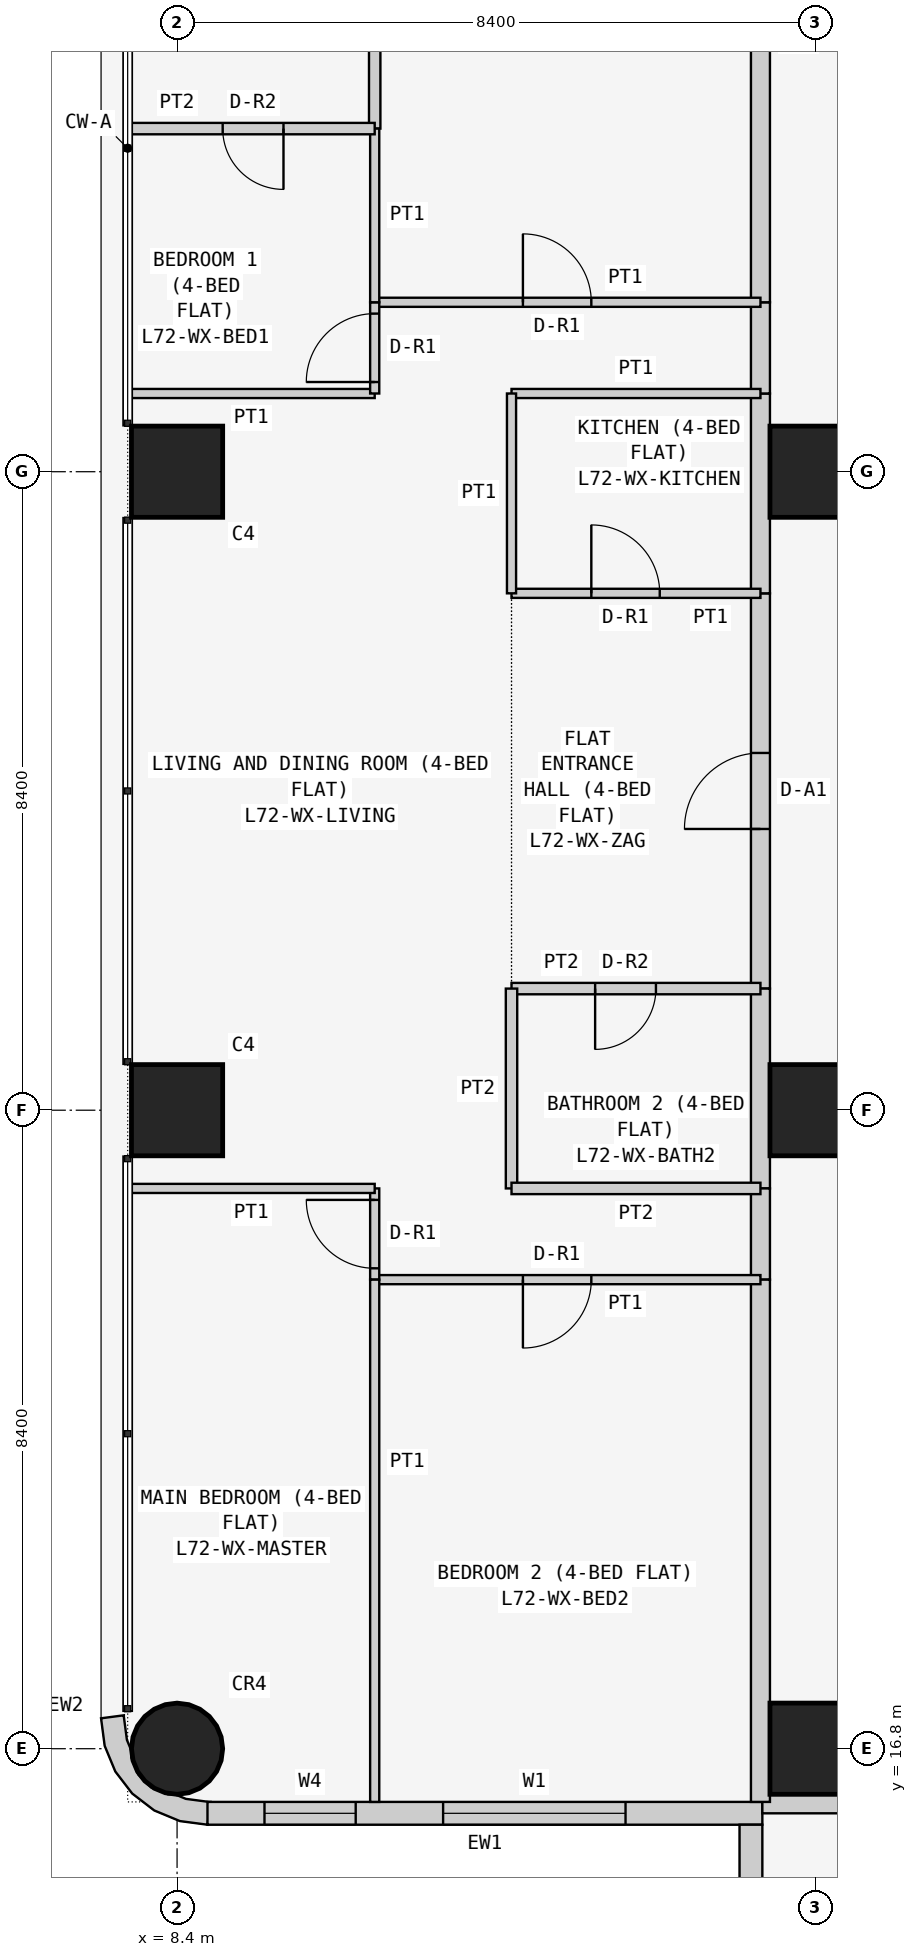
"""IFC4 building model, lengths in metres.
Left out: names, types, materials, properties, quantities, classifications, styles, units other than length and angle.
Written with IfcOpenShell. Run it as: python <this file> out.ifc"""

import sys

from ifc_helpers import new_model, si_unit, direction, frame, frame_2d, origin, origin_2d, place, context, subcontext, project, spatial, polyline, rectangle, circle, outline, extrude, element, fill, save


model = new_model("IFC4")
c1 = context("Model", 3, precision=1e-05, world=origin(), true_north=direction((0.0, 1.0)))
c2 = subcontext(c1, "Body", "Model", "MODEL_VIEW")
j1 = project(units=[si_unit("LENGTHUNIT", "METRE"), si_unit("PLANEANGLEUNIT", "RADIAN")], contexts=[c1])
p1 = place(None, origin())
s1 = spatial("IfcSite", under=j1, at=p1, CompositionType="ELEMENT")
p2 = place(p1, origin())
s2 = spatial("IfcBuilding", under=s1, at=p2, CompositionType="ELEMENT")
p3 = place(p2, frame((0.0, 0.0, 275.7)))
s3 = spatial("IfcBuildingStorey", under=s2, at=p3, CompositionType="ELEMENT", Elevation=275.7)
p4 = place(p3, frame((8.4, 16.8, 0.0), z_axis=(0.0, 0.0, 1.0), x_axis=(1.0, 0.0, 0.0)))
e1 = element("IfcColumn", 1, at=p4, inside=s3, PredefinedType="COLUMN", context=c2, shape_type="SweptSolid", body=[
    extrude(circle(Radius=0.6, at=origin_2d()), origin(), (0.0, 0.0, 1.0), 3.6),
])
for number, where, z_axis, x_axis in (
    (2, (8.4, 25.2, 0.0), (0.0, 0.0, 1.0), (1.0, 0.0, 0.0)),
    (3, (8.4, 33.6, 0.0), (0.0, 0.0, 1.0), (1.0, 0.0, 0.0)),
    (4, (16.8, 16.8, 0.0), (0.0, 0.0, 1.0), (1.0, 0.0, 0.0)),
    (5, (16.8, 25.2, 0.0), (0.0, 0.0, 1.0), (1.0, 0.0, 0.0)),
    (6, (16.8, 33.6, 0.0), (0.0, 0.0, 1.0), (1.0, 0.0, 0.0)),
):
    element("IfcColumn", number, at=place(p3, frame(where, z_axis=z_axis, x_axis=x_axis)), inside=s3, PredefinedType="COLUMN", context=c2, shape_type="SweptSolid", body=[
        extrude(rectangle(XDim=1.2, YDim=1.2, at=origin_2d()), origin(), (0.0, 0.0, 1.0), 3.6),
    ])
p5 = place(p3, frame((8.8, 15.95, 0.0), z_axis=(0.0, 0.0, 1.0), x_axis=(1.0, 0.0, 0.0)))
e7 = element("IfcWall", 7, at=p5, inside=s3, PredefinedType="SOLIDWALL", context=c2, shape_type="SweptSolid", body=[
    extrude(rectangle(XDim=7.3, YDim=0.3, at=frame_2d((3.65, 0.0))), origin(), (0.0, 0.0, 1.0), 3.45),
])
p6 = place(p5, frame((3.1, 0.0, 0.9)))
e8 = element("IfcOpeningElement", 8, at=p6, cuts=e7, PredefinedType="OPENING", context=c2, shape_type="SweptSolid", body=[
    extrude(rectangle(XDim=2.4, YDim=1.5, at=frame_2d((1.2, 0.75))), frame((0.0, 0.16, 0.0), z_axis=(0.0, -1.0, 0.0), x_axis=(1.0, 0.0, 0.0)), (0.0, 0.0, 1.0), 0.32),
])
p7 = place(p5, frame((0.75, 0.0, 0.9)))
e9 = element("IfcOpeningElement", 9, at=p7, cuts=e7, PredefinedType="OPENING", context=c2, shape_type="SweptSolid", body=[
    extrude(rectangle(XDim=1.2, YDim=1.5, at=frame_2d((0.6, 0.75))), frame((0.0, 0.16, 0.0), z_axis=(0.0, -1.0, 0.0), x_axis=(1.0, 0.0, 0.0)), (0.0, 0.0, 1.0), 0.32),
])
p8 = place(p3, frame((15.95, 15.8, 0.0), z_axis=(0.0, 0.0, 1.0), x_axis=(0.0, -1.0, 0.0)))
e10 = element("IfcWall", 10, at=p8, inside=s3, PredefinedType="SOLIDWALL", context=c2, shape_type="SweptSolid", body=[
    extrude(rectangle(XDim=7.0, YDim=0.3, at=frame_2d((3.5, 0.0))), origin(), (0.0, 0.0, 1.0), 3.45),
])
p9 = place(p8, frame((1.5, 0.0, 0.9)))
e11 = element("IfcOpeningElement", 11, at=p9, cuts=e10, PredefinedType="OPENING", context=c2, shape_type="SweptSolid", body=[
    extrude(rectangle(XDim=2.4, YDim=1.5, at=frame_2d((1.2, 0.75))), frame((0.0, 0.16, 0.0), z_axis=(0.0, -1.0, 0.0), x_axis=(1.0, 0.0, 0.0)), (0.0, 0.0, 1.0), 0.32),
])
p10 = place(p8, frame((5.05, 0.0, 0.9)))
e12 = element("IfcOpeningElement", 12, at=p10, cuts=e10, PredefinedType="OPENING", context=c2, shape_type="SweptSolid", body=[
    extrude(rectangle(XDim=1.2, YDim=1.5, at=frame_2d((0.6, 0.75))), frame((0.0, 0.16, 0.0), z_axis=(0.0, -1.0, 0.0), x_axis=(1.0, 0.0, 0.0)), (0.0, 0.0, 1.0), 0.32),
])
p11 = place(p3, frame((7.824, 17.162, 0.0), z_axis=(0.0, 0.0, 1.0), x_axis=(-0.707106781187, -0.707106781187, 0.0)))
e13 = element("IfcWall", 13, at=p11, inside=s3, PredefinedType="SOLIDWALL", context=c2, shape_type="SweptSolid", body=[
    extrude(outline(polyline([(0.047, 1.454), (0.233, 1.212), (0.292, 1.069), (0.358, 1.003), (0.449, 0.782), (0.449, 0.543), (0.358, 0.323), (0.292, 0.257), (0.233, 0.114), (0.047, -0.129), (0.033, -0.143), (0.273, -0.327), (0.495, -0.037), (0.635, 0.301), (0.683, 0.663), (0.635, 1.025), (0.495, 1.363), (0.273, 1.653), (0.033, 1.469), (0.047, 1.454)])), origin(), (0.0, 0.0, 1.0), 3.45),
])
p12 = place(p3, frame((22.571, 16.075, 0.0), z_axis=(0.0, 0.0, 1.0), x_axis=(-1.0, 0.0, 0.0)))
e14 = element("IfcWall", 14, at=p12, inside=s3, PredefinedType="PARTITIONING", context=c2, shape_type="SweptSolid", body=[
    extrude(rectangle(XDim=6.471, YDim=0.25, at=frame_2d((3.235, 0.0))), origin(), (0.0, 0.0, 1.0), 3.45),
])
p13 = place(p3, frame((16.075, 26.8, 0.0), z_axis=(0.0, 0.0, 1.0), x_axis=(0.0, 1.0, 0.0)))
e15 = element("IfcWall", 15, at=p13, inside=s3, PredefinedType="PARTITIONING", context=c2, shape_type="SweptSolid", body=[
    extrude(rectangle(XDim=5.2, YDim=0.25, at=frame_2d((2.6, 0.0))), origin(), (0.0, 0.0, 1.0), 3.45),
])
p14 = place(p13, frame((2.1, 0.0, 0.0)))
e16 = element("IfcOpeningElement", 16, at=p14, cuts=e15, PredefinedType="OPENING", context=c2, shape_type="SweptSolid", body=[
    extrude(rectangle(XDim=1.0, YDim=2.1, at=frame_2d((0.5, 1.05))), frame((0.0, 0.135, 0.0), z_axis=(0.0, -1.0, 0.0), x_axis=(1.0, 0.0, 0.0)), (0.0, 0.0, 1.0), 0.27),
])
p15 = place(p3, frame((16.075, 24.171, 0.0), z_axis=(0.0, 0.0, 1.0), x_axis=(0.0, 1.0, 0.0)))
e17 = element("IfcWall", 17, at=p15, inside=s3, PredefinedType="PARTITIONING", context=c2, shape_type="SweptSolid", body=[
    extrude(rectangle(XDim=2.629, YDim=0.25, at=frame_2d((1.314, 0.0))), origin(), (0.0, 0.0, 1.0), 3.45),
])
p16 = place(p3, frame((16.075, 32.0, 0.0), z_axis=(0.0, 0.0, 1.0), x_axis=(0.0, 1.0, 0.0)))
e18 = element("IfcWall", 18, at=p16, inside=s3, PredefinedType="PARTITIONING", context=c2, shape_type="SweptSolid", body=[
    extrude(rectangle(XDim=2.629, YDim=0.25, at=frame_2d((1.314, 0.0))), origin(), (0.0, 0.0, 1.0), 3.45),
])
p17 = place(p3, frame((16.075, 22.971, 0.0), z_axis=(0.0, 0.0, 1.0), x_axis=(0.0, 1.0, 0.0)))
e19 = element("IfcWall", 19, at=p17, inside=s3, PredefinedType="PARTITIONING", context=c2, shape_type="SweptSolid", body=[
    extrude(rectangle(XDim=1.2, YDim=0.25, at=frame_2d((0.6, 0.0))), origin(), (0.0, 0.0, 1.0), 3.45),
])
p18 = place(p3, frame((16.075, 34.629, 0.0), z_axis=(0.0, 0.0, 1.0), x_axis=(0.0, 1.0, 0.0)))
e20 = element("IfcWall", 20, at=p18, inside=s3, PredefinedType="PARTITIONING", context=c2, shape_type="SweptSolid", body=[
    extrude(rectangle(XDim=1.2, YDim=0.25, at=frame_2d((0.6, 0.0))), origin(), (0.0, 0.0, 1.0), 3.45),
])
for number, where, z_axis, x_axis in (
    (21, (16.075, 16.1, 0.0), (0.0, 0.0, 1.0), (0.0, 1.0, 0.0)),
    (22, (16.075, 35.829, 0.0), (0.0, 0.0, 1.0), (0.0, 1.0, 0.0)),
):
    element("IfcWall", number, at=place(p3, frame(where, z_axis=z_axis, x_axis=x_axis)), inside=s3, PredefinedType="PARTITIONING", context=c2, shape_type="SweptSolid", body=[
        extrude(rectangle(XDim=6.871, YDim=0.25, at=frame_2d((3.436, 0.0))), origin(), (0.0, 0.0, 1.0), 3.45),
    ])
p19 = place(p3, frame((12.8, 26.8, 0.0), z_axis=(0.0, 0.0, 1.0), x_axis=(1.0, 0.0, 0.0)))
e23 = element("IfcWall", 23, at=p19, inside=s3, PredefinedType="PARTITIONING", context=c2, shape_type="SweptSolid", body=[
    extrude(rectangle(XDim=3.275, YDim=0.15, at=frame_2d((1.637, 0.0))), origin(), (0.0, 0.0, 1.0), 3.45),
])
p20 = place(p19, frame((1.1, 0.0, 0.0)))
e24 = element("IfcOpeningElement", 24, at=p20, cuts=e23, PredefinedType="OPENING", context=c2, shape_type="SweptSolid", body=[
    extrude(rectangle(XDim=0.8, YDim=2.1, at=frame_2d((0.4, 1.05))), frame((0.0, 0.085, 0.0), z_axis=(0.0, -1.0, 0.0), x_axis=(1.0, 0.0, 0.0)), (0.0, 0.0, 1.0), 0.17),
])
p21 = place(p3, frame((16.075, 32.0, 0.0), z_axis=(0.0, 0.0, 1.0), x_axis=(-1.0, 0.0, 0.0)))
e25 = element("IfcWall", 25, at=p21, inside=s3, PredefinedType="PARTITIONING", context=c2, shape_type="SweptSolid", body=[
    extrude(rectangle(XDim=3.275, YDim=0.12, at=frame_2d((1.637, 0.0))), origin(), (0.0, 0.0, 1.0), 3.45),
])
p22 = place(p21, frame((1.325, 0.0, 0.0)))
e26 = element("IfcOpeningElement", 26, at=p22, cuts=e25, PredefinedType="OPENING", context=c2, shape_type="SweptSolid", body=[
    extrude(rectangle(XDim=0.9, YDim=2.1, at=frame_2d((0.45, 1.05))), frame((0.0, 0.07, 0.0), z_axis=(0.0, -1.0, 0.0), x_axis=(1.0, 0.0, 0.0)), (0.0, 0.0, 1.0), 0.14),
])
p23 = place(p3, frame((12.8, 26.8, 0.0), z_axis=(0.0, 0.0, 1.0), x_axis=(0.0, -1.0, 0.0)))
e27 = element("IfcWall", 27, at=p23, inside=s3, PredefinedType="PARTITIONING", context=c2, shape_type="SweptSolid", body=[
    extrude(rectangle(XDim=2.629, YDim=0.15, at=frame_2d((1.314, 0.0))), origin(), (0.0, 0.0, 1.0), 3.45),
])
p24 = place(p3, frame((12.8, 24.171, 0.0), z_axis=(0.0, 0.0, 1.0), x_axis=(1.0, 0.0, 0.0)))
e28 = element("IfcWall", 28, at=p24, inside=s3, PredefinedType="PARTITIONING", context=c2, shape_type="SweptSolid", body=[
    extrude(rectangle(XDim=3.275, YDim=0.15, at=frame_2d((1.637, 0.0))), origin(), (0.0, 0.0, 1.0), 3.45),
])
p25 = place(p3, frame((16.075, 34.629, 0.0), z_axis=(0.0, 0.0, 1.0), x_axis=(-1.0, 0.0, 0.0)))
e29 = element("IfcWall", 29, at=p25, inside=s3, PredefinedType="PARTITIONING", context=c2, shape_type="SweptSolid", body=[
    extrude(rectangle(XDim=3.275, YDim=0.12, at=frame_2d((1.637, 0.0))), origin(), (0.0, 0.0, 1.0), 3.45),
])
p26 = place(p3, frame((12.8, 34.629, 0.0), z_axis=(0.0, 0.0, 1.0), x_axis=(0.0, -1.0, 0.0)))
e30 = element("IfcWall", 30, at=p26, inside=s3, PredefinedType="PARTITIONING", context=c2, shape_type="SweptSolid", body=[
    extrude(rectangle(XDim=2.629, YDim=0.12, at=frame_2d((1.314, 0.0))), origin(), (0.0, 0.0, 1.0), 3.45),
])
p27 = place(p3, frame((16.075, 22.971, 0.0), z_axis=(0.0, 0.0, 1.0), x_axis=(-1.0, 0.0, 0.0)))
e31 = element("IfcWall", 31, at=p27, inside=s3, PredefinedType="PARTITIONING", context=c2, shape_type="SweptSolid", body=[
    extrude(rectangle(XDim=5.075, YDim=0.12, at=frame_2d((2.538, 0.0))), origin(), (0.0, 0.0, 1.0), 3.45),
])
p28 = place(p27, frame((2.225, 0.0, 0.0)))
e32 = element("IfcOpeningElement", 32, at=p28, cuts=e31, PredefinedType="OPENING", context=c2, shape_type="SweptSolid", body=[
    extrude(rectangle(XDim=0.9, YDim=2.1, at=frame_2d((0.45, 1.05))), frame((0.0, 0.07, 0.0), z_axis=(0.0, -1.0, 0.0), x_axis=(1.0, 0.0, 0.0)), (0.0, 0.0, 1.0), 0.14),
])
p29 = place(p3, frame((11.0, 22.971, 0.0), z_axis=(0.0, 0.0, 1.0), x_axis=(0.0, 1.0, 0.0)))
e33 = element("IfcWall", 33, at=p29, inside=s3, PredefinedType="PARTITIONING", context=c2, shape_type="SweptSolid", body=[
    extrude(rectangle(XDim=1.2, YDim=0.12, at=frame_2d((0.6, 0.0))), origin(), (0.0, 0.0, 1.0), 3.45),
])
p30 = place(p29, frame((0.149, 0.0, 0.0)))
e34 = element("IfcOpeningElement", 34, at=p30, cuts=e33, PredefinedType="OPENING", context=c2, shape_type="SweptSolid", body=[
    extrude(rectangle(XDim=0.9, YDim=2.1, at=frame_2d((0.45, 1.05))), frame((0.0, 0.07, 0.0), z_axis=(0.0, -1.0, 0.0), x_axis=(1.0, 0.0, 0.0)), (0.0, 0.0, 1.0), 0.14),
])
p31 = place(p3, frame((11.0, 24.171, 0.0), z_axis=(0.0, 0.0, 1.0), x_axis=(-1.0, 0.0, 0.0)))
e35 = element("IfcWall", 35, at=p31, inside=s3, PredefinedType="PARTITIONING", context=c2, shape_type="SweptSolid", body=[
    extrude(rectangle(XDim=3.25, YDim=0.12, at=frame_2d((1.625, 0.0))), origin(), (0.0, 0.0, 1.0), 3.45),
])
p32 = place(p3, frame((11.0, 35.829, 0.0), z_axis=(0.0, 0.0, 1.0), x_axis=(1.0, 0.0, 0.0)))
e36 = element("IfcWall", 36, at=p32, inside=s3, PredefinedType="PARTITIONING", context=c2, shape_type="SweptSolid", body=[
    extrude(rectangle(XDim=5.075, YDim=0.12, at=frame_2d((2.538, 0.0))), origin(), (0.0, 0.0, 1.0), 3.45),
])
p33 = place(p32, frame((1.95, 0.0, 0.0)))
e37 = element("IfcOpeningElement", 37, at=p33, cuts=e36, PredefinedType="OPENING", context=c2, shape_type="SweptSolid", body=[
    extrude(rectangle(XDim=0.9, YDim=2.1, at=frame_2d((0.45, 1.05))), frame((0.0, 0.07, 0.0), z_axis=(0.0, -1.0, 0.0), x_axis=(1.0, 0.0, 0.0)), (0.0, 0.0, 1.0), 0.14),
])
p34 = place(p3, frame((7.75, 34.629, 0.0), z_axis=(0.0, 0.0, 1.0), x_axis=(1.0, 0.0, 0.0)))
e38 = element("IfcWall", 38, at=p34, inside=s3, PredefinedType="PARTITIONING", context=c2, shape_type="SweptSolid", body=[
    extrude(rectangle(XDim=3.25, YDim=0.12, at=frame_2d((1.625, 0.0))), origin(), (0.0, 0.0, 1.0), 3.45),
])
p35 = place(p3, frame((11.0, 34.629, 0.0), z_axis=(0.0, 0.0, 1.0), x_axis=(0.0, 1.0, 0.0)))
e39 = element("IfcWall", 39, at=p35, inside=s3, PredefinedType="PARTITIONING", context=c2, shape_type="SweptSolid", body=[
    extrude(rectangle(XDim=1.2, YDim=0.12, at=frame_2d((0.6, 0.0))), origin(), (0.0, 0.0, 1.0), 3.45),
])
p36 = place(p35, frame((0.151, 0.0, 0.0)))
e40 = element("IfcOpeningElement", 40, at=p36, cuts=e39, PredefinedType="OPENING", context=c2, shape_type="SweptSolid", body=[
    extrude(rectangle(XDim=0.9, YDim=2.1, at=frame_2d((0.45, 1.05))), frame((0.0, 0.07, 0.0), z_axis=(0.0, -1.0, 0.0), x_axis=(1.0, 0.0, 0.0)), (0.0, 0.0, 1.0), 0.14),
])
p37 = place(p3, frame((11.0, 22.971, 0.0), z_axis=(0.0, 0.0, 1.0), x_axis=(0.0, -1.0, 0.0)))
e41 = element("IfcWall", 41, at=p37, inside=s3, PredefinedType="PARTITIONING", context=c2, shape_type="SweptSolid", body=[
    extrude(rectangle(XDim=6.871, YDim=0.12, at=frame_2d((3.436, 0.0))), origin(), (0.0, 0.0, 1.0), 3.45),
])
p38 = place(p3, frame((11.0, 42.7, 0.0), z_axis=(0.0, 0.0, 1.0), x_axis=(0.0, -1.0, 0.0)))
e42 = element("IfcWall", 42, at=p38, inside=s3, PredefinedType="PARTITIONING", context=c2, shape_type="SweptSolid", body=[
    extrude(rectangle(XDim=4.586, YDim=0.15, at=frame_2d((2.293, 0.0))), origin(), (0.0, 0.0, 1.0), 3.45),
])
p39 = place(p3, frame((11.0, 38.114, 0.0), z_axis=(0.0, 0.0, 1.0), x_axis=(0.0, -1.0, 0.0)))
e43 = element("IfcWall", 43, at=p39, inside=s3, PredefinedType="PARTITIONING", context=c2, shape_type="SweptSolid", body=[
    extrude(rectangle(XDim=2.285, YDim=0.12, at=frame_2d((1.143, 0.0))), origin(), (0.0, 0.0, 1.0), 3.45),
])
p40 = place(p3, frame((7.75, 38.114, 0.0), z_axis=(0.0, 0.0, 1.0), x_axis=(1.0, 0.0, 0.0)))
e44 = element("IfcWall", 44, at=p40, inside=s3, PredefinedType="PARTITIONING", context=c2, shape_type="SweptSolid", body=[
    extrude(rectangle(XDim=3.25, YDim=0.15, at=frame_2d((1.625, 0.0))), origin(), (0.0, 0.0, 1.0), 3.45),
])
p41 = place(p40, frame((1.25, 0.0, 0.0)))
e45 = element("IfcOpeningElement", 45, at=p41, cuts=e44, PredefinedType="OPENING", context=c2, shape_type="SweptSolid", body=[
    extrude(rectangle(XDim=0.8, YDim=2.1, at=frame_2d((0.4, 1.05))), frame((0.0, 0.085, 0.0), z_axis=(0.0, -1.0, 0.0), x_axis=(1.0, 0.0, 0.0)), (0.0, 0.0, 1.0), 0.17),
])
p42 = place(p6, origin())
e46 = element("IfcWindow", 46, at=p42, inside=s3, PartitioningType="SINGLE_PANEL", PredefinedType="WINDOW", context=c2, shape_type="SweptSolid", body=[
    extrude(rectangle(XDim=2.4, YDim=1.5, at=frame_2d((1.2, 0.75))), frame((0.0, 0.03, 0.0), z_axis=(0.0, -1.0, 0.0), x_axis=(1.0, 0.0, 0.0)), (0.0, 0.0, 1.0), 0.06),
])
fill(e8, e46)
p43 = place(p7, origin())
e47 = element("IfcWindow", 47, at=p43, inside=s3, PartitioningType="SINGLE_PANEL", PredefinedType="WINDOW", context=c2, shape_type="SweptSolid", body=[
    extrude(rectangle(XDim=1.2, YDim=1.5, at=frame_2d((0.6, 0.75))), frame((0.0, 0.03, 0.0), z_axis=(0.0, -1.0, 0.0), x_axis=(1.0, 0.0, 0.0)), (0.0, 0.0, 1.0), 0.06),
])
fill(e9, e47)
p44 = place(p14, origin())
e48 = element("IfcDoor", 48, at=p44, inside=s3, OperationType="SINGLE_SWING_LEFT", PredefinedType="DOOR", context=c2, shape_type="SweptSolid", body=[
    extrude(rectangle(XDim=1.0, YDim=2.1, at=frame_2d((0.5, 1.05))), frame((0.0, 0.025, 0.0), z_axis=(0.0, -1.0, 0.0), x_axis=(1.0, 0.0, 0.0)), (0.0, 0.0, 1.0), 0.05),
])
fill(e16, e48)
p45 = place(p20, frame((0.8, 0.0, 0.0), z_axis=(0.0, 0.0, 1.0), x_axis=(-1.0, 0.0, 0.0)))
e49 = element("IfcDoor", 49, at=p45, inside=s3, OperationType="SINGLE_SWING_RIGHT", PredefinedType="DOOR", context=c2, shape_type="SweptSolid", body=[
    extrude(rectangle(XDim=0.8, YDim=2.1, at=frame_2d((0.4, 1.05))), frame((0.0, 0.025, 0.0), z_axis=(0.0, -1.0, 0.0), x_axis=(1.0, 0.0, 0.0)), (0.0, 0.0, 1.0), 0.05),
])
fill(e24, e49)
p46 = place(p22, frame((0.9, 0.0, 0.0), z_axis=(0.0, 0.0, 1.0), x_axis=(-1.0, 0.0, 0.0)))
e50 = element("IfcDoor", 50, at=p46, inside=s3, OperationType="SINGLE_SWING_LEFT", PredefinedType="DOOR", context=c2, shape_type="SweptSolid", body=[
    extrude(rectangle(XDim=0.9, YDim=2.1, at=frame_2d((0.45, 1.05))), frame((0.0, 0.025, 0.0), z_axis=(0.0, -1.0, 0.0), x_axis=(1.0, 0.0, 0.0)), (0.0, 0.0, 1.0), 0.05),
])
fill(e26, e50)
p47 = place(p28, origin())
e51 = element("IfcDoor", 51, at=p47, inside=s3, OperationType="SINGLE_SWING_RIGHT", PredefinedType="DOOR", context=c2, shape_type="SweptSolid", body=[
    extrude(rectangle(XDim=0.9, YDim=2.1, at=frame_2d((0.45, 1.05))), frame((0.0, 0.025, 0.0), z_axis=(0.0, -1.0, 0.0), x_axis=(1.0, 0.0, 0.0)), (0.0, 0.0, 1.0), 0.05),
])
fill(e32, e51)
p48 = place(p30, origin())
e52 = element("IfcDoor", 52, at=p48, inside=s3, OperationType="SINGLE_SWING_RIGHT", PredefinedType="DOOR", context=c2, shape_type="SweptSolid", body=[
    extrude(rectangle(XDim=0.9, YDim=2.1, at=frame_2d((0.45, 1.05))), frame((0.0, 0.025, 0.0), z_axis=(0.0, -1.0, 0.0), x_axis=(1.0, 0.0, 0.0)), (0.0, 0.0, 1.0), 0.05),
])
fill(e34, e52)
p49 = place(p33, origin())
e53 = element("IfcDoor", 53, at=p49, inside=s3, OperationType="SINGLE_SWING_LEFT", PredefinedType="DOOR", context=c2, shape_type="SweptSolid", body=[
    extrude(rectangle(XDim=0.9, YDim=2.1, at=frame_2d((0.45, 1.05))), frame((0.0, 0.025, 0.0), z_axis=(0.0, -1.0, 0.0), x_axis=(1.0, 0.0, 0.0)), (0.0, 0.0, 1.0), 0.05),
])
fill(e37, e53)
p50 = place(p36, origin())
e54 = element("IfcDoor", 54, at=p50, inside=s3, OperationType="SINGLE_SWING_LEFT", PredefinedType="DOOR", context=c2, shape_type="SweptSolid", body=[
    extrude(rectangle(XDim=0.9, YDim=2.1, at=frame_2d((0.45, 1.05))), frame((0.0, 0.025, 0.0), z_axis=(0.0, -1.0, 0.0), x_axis=(1.0, 0.0, 0.0)), (0.0, 0.0, 1.0), 0.05),
])
fill(e40, e54)
p51 = place(p41, frame((0.8, 0.0, 0.0), z_axis=(0.0, 0.0, 1.0), x_axis=(-1.0, 0.0, 0.0)))
e55 = element("IfcDoor", 55, at=p51, inside=s3, OperationType="SINGLE_SWING_LEFT", PredefinedType="DOOR", context=c2, shape_type="SweptSolid", body=[
    extrude(rectangle(XDim=0.8, YDim=2.1, at=frame_2d((0.4, 1.05))), frame((0.0, 0.025, 0.0), z_axis=(0.0, -1.0, 0.0), x_axis=(1.0, 0.0, 0.0)), (0.0, 0.0, 1.0), 0.05),
])
fill(e45, e55)
save(model, sys.argv[1])
